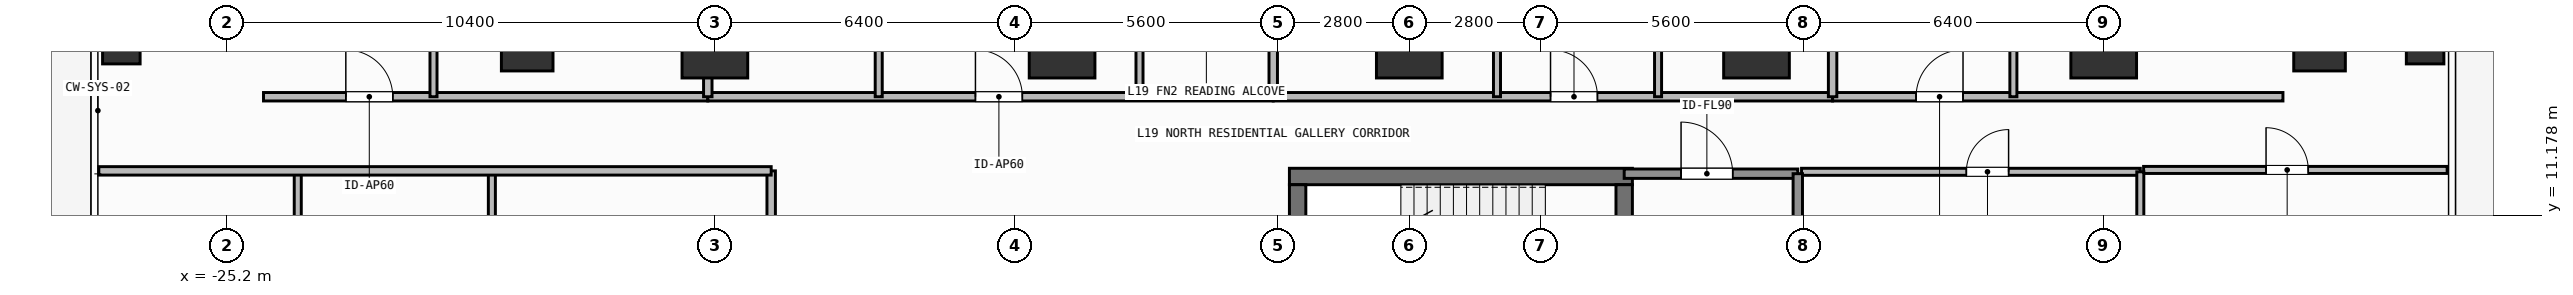
"""IFC4 building model, lengths in metres.
Left out: names, types, materials, properties, quantities, classifications, styles, units other than length and angle.
Written with IfcOpenShell. Run it as: python <this file> out.ifc"""

import sys

from ifc_helpers import new_model, si_unit, direction, frame, frame_2d, origin, origin_2d, place, context, subcontext, project, spatial, rectangle, hollow_rectangle, extrude, element, fill, save


model = new_model("IFC4")
c1 = context("Model", 3, precision=1e-05, world=origin(), true_north=direction((0.0, 1.0)))
c2 = subcontext(c1, "Body", "Model", "MODEL_VIEW")
j1 = project(units=[si_unit("LENGTHUNIT", "METRE"), si_unit("PLANEANGLEUNIT", "RADIAN")], contexts=[c1])
p1 = place(None, origin())
s1 = spatial("IfcSite", under=j1, at=p1, CompositionType="ELEMENT")
p2 = place(p1, origin())
s2 = spatial("IfcBuilding", under=s1, at=p2, CompositionType="ELEMENT")
p3 = place(p2, frame((0.0, 0.0, 73.5)))
s3 = spatial("IfcBuildingStorey", under=s2, at=p3, CompositionType="ELEMENT", Elevation=73.5)
p4 = place(p3, frame((-2.555, 12.0, 0.0), z_axis=(0.0, 0.0, 1.0), x_axis=(1.0, 0.0, 0.0)))
e1 = element("IfcWall", 1, at=p4, inside=s3, PredefinedType="SHEAR", context=c2, shape_type="SweptSolid", body=[
    extrude(rectangle(XDim=7.31, YDim=0.35, at=frame_2d((3.655, 0.0))), origin(), (0.0, 0.0, 1.0), 3.9),
])
p5 = place(p3, frame((-2.38, 8.9, 0.0), z_axis=(0.0, 0.0, 1.0), x_axis=(0.0, 1.0, 0.0)))
e2 = element("IfcWall", 2, at=p5, inside=s3, PredefinedType="SHEAR", context=c2, shape_type="SweptSolid", body=[
    extrude(rectangle(XDim=2.925, YDim=0.35, at=frame_2d((1.462, 0.0))), origin(), (0.0, 0.0, 1.0), 3.9),
])
p6 = place(p3, frame((4.58, 11.825, 0.0), z_axis=(0.0, 0.0, 1.0), x_axis=(0.0, -1.0, 0.0)))
e3 = element("IfcWall", 3, at=p6, inside=s3, PredefinedType="SHEAR", context=c2, shape_type="SweptSolid", body=[
    extrude(rectangle(XDim=2.925, YDim=0.35, at=frame_2d((1.462, 0.0))), origin(), (0.0, 0.0, 1.0), 3.9),
])
p7 = place(p6, frame((0.913, 0.0, 0.0)))
e4 = element("IfcOpeningElement", 4, at=p7, cuts=e3, PredefinedType="OPENING", context=c2, shape_type="SweptSolid", body=[
    extrude(rectangle(XDim=1.1, YDim=2.15, at=frame_2d((0.55, 1.075))), frame((0.0, 0.185, 0.0), z_axis=(0.0, -1.0, 0.0), x_axis=(1.0, 0.0, 0.0)), (0.0, 0.0, 1.0), 0.37),
])
for number, where, z_axis, x_axis in (
    (5, (-14.8, 14.8, 0.0), (0.0, 0.0, 1.0), (1.0, 0.0, 0.0)),
    (6, (-7.4, 14.8, 0.0), (0.0, 0.0, 1.0), (1.0, 0.0, 0.0)),
    (7, (0.0, 14.8, 0.0), (0.0, 0.0, 1.0), (1.0, 0.0, 0.0)),
    (8, (7.4, 14.8, 0.0), (0.0, 0.0, 1.0), (1.0, 0.0, 0.0)),
    (9, (14.8, 14.8, 0.0), (0.0, 0.0, 1.0), (1.0, 0.0, 0.0)),
):
    element("IfcColumn", number, at=place(p3, frame(where, z_axis=z_axis, x_axis=x_axis)), inside=s3, PredefinedType="COLUMN", context=c2, shape_type="SweptSolid", body=[
        extrude(rectangle(XDim=1.4, YDim=1.4, at=origin_2d()), origin(), (0.0, 0.0, 1.0), 3.9),
    ])
for number, where, z_axis, x_axis in (
    (10, (-18.8, 14.8, 0.0), (0.0, 0.0, 1.0), (1.0, 0.0, 0.0)),
    (11, (19.4, 14.8, 0.0), (0.0, 0.0, 1.0), (1.0, 0.0, 0.0)),
):
    element("IfcColumn", number, at=place(p3, frame(where, z_axis=z_axis, x_axis=x_axis)), inside=s3, PredefinedType="COLUMN", context=c2, shape_type="SweptSolid", body=[
        extrude(rectangle(XDim=1.1, YDim=1.1, at=origin_2d()), origin(), (0.0, 0.0, 1.0), 3.9),
    ])
for number, where, z_axis, x_axis in (
    (12, (-27.45, 14.8, 0.0), (0.0, 0.0, 1.0), (1.0, 0.0, 0.0)),
    (13, (21.65, 14.8, 0.0), (0.0, 0.0, 1.0), (1.0, 0.0, 0.0)),
):
    element("IfcColumn", number, at=place(p3, frame(where, z_axis=z_axis, x_axis=x_axis)), inside=s3, PredefinedType="COLUMN", context=c2, shape_type="SweptSolid", body=[
        extrude(hollow_rectangle(XDim=0.8, YDim=0.8, WallThickness=0.036, at=origin_2d()), origin(), (0.0, 0.0, 1.0), 3.9),
    ])
p8 = place(p3, frame((4.58, 12.06, 0.0), z_axis=(0.0, 0.0, 1.0), x_axis=(1.0, 0.0, 0.0)))
e14 = element("IfcWall", 14, at=p8, inside=s3, PredefinedType="SOLIDWALL", context=c2, shape_type="SweptSolid", body=[
    extrude(rectangle(XDim=3.7, YDim=0.2, at=frame_2d((1.85, 0.0))), origin(), (0.0, 0.0, 1.0), 3.6),
])
p9 = place(p8, frame((1.212, 0.0, 0.0)))
e15 = element("IfcOpeningElement", 15, at=p9, cuts=e14, PredefinedType="OPENING", context=c2, shape_type="SweptSolid", body=[
    extrude(rectangle(XDim=1.1, YDim=2.15, at=frame_2d((0.55, 1.075))), frame((0.0, 0.11, 0.0), z_axis=(0.0, -1.0, 0.0), x_axis=(1.0, 0.0, 0.0)), (0.0, 0.0, 1.0), 0.22),
])
p10 = place(p3, frame((8.36, 12.1, 0.0), z_axis=(0.0, 0.0, 1.0), x_axis=(1.0, 0.0, 0.0)))
e16 = element("IfcWall", 16, at=p10, inside=s3, PredefinedType="PARTITIONING", context=c2, shape_type="SweptSolid", body=[
    extrude(rectangle(XDim=7.22, YDim=0.15, at=frame_2d((3.61, 0.0))), origin(), (0.0, 0.0, 1.0), 3.6),
])
p11 = place(p10, frame((3.513, 0.0, 0.0)))
e17 = element("IfcOpeningElement", 17, at=p11, cuts=e16, PredefinedType="OPENING", context=c2, shape_type="SweptSolid", body=[
    extrude(rectangle(XDim=0.9, YDim=2.1, at=frame_2d((0.45, 1.05))), frame((0.0, 0.085, 0.0), z_axis=(0.0, -1.0, 0.0), x_axis=(1.0, 0.0, 0.0)), (0.0, 0.0, 1.0), 0.17),
])
p12 = place(p3, frame((-24.42, 13.7, 0.0), z_axis=(0.0, 0.0, 1.0), x_axis=(1.0, 0.0, 0.0)))
e18 = element("IfcWall", 18, at=p12, inside=s3, PredefinedType="PARTITIONING", context=c2, shape_type="SweptSolid", body=[
    extrude(rectangle(XDim=9.469, YDim=0.18, at=frame_2d((4.734, 0.0))), origin(), (0.0, 0.0, 1.0), 3.6),
])
p13 = place(p12, frame((1.754, 0.0, 0.0)))
e19 = element("IfcOpeningElement", 19, at=p13, cuts=e18, PredefinedType="OPENING", context=c2, shape_type="SweptSolid", body=[
    extrude(rectangle(XDim=1.0, YDim=2.2, at=frame_2d((0.5, 1.1))), frame((0.0, 0.1, 0.0), z_axis=(0.0, -1.0, 0.0), x_axis=(1.0, 0.0, 0.0)), (0.0, 0.0, 1.0), 0.2),
])
p14 = place(p3, frame((-20.797, 13.7, 0.0), z_axis=(0.0, 0.0, 1.0), x_axis=(0.0, 1.0, 0.0)))
e20 = element("IfcWall", 20, at=p14, inside=s3, PredefinedType="PARTITIONING", context=c2, shape_type="SweptSolid", body=[
    extrude(rectangle(XDim=3.899, YDim=0.15, at=frame_2d((1.95, 0.0))), origin(), (0.0, 0.0, 1.0), 3.6),
])
p15 = place(p14, frame((1.524, 0.0, 0.0)))
e21 = element("IfcOpeningElement", 21, at=p15, cuts=e20, PredefinedType="OPENING", context=c2, shape_type="SweptSolid", body=[
    extrude(rectangle(XDim=0.85, YDim=2.1, at=frame_2d((0.425, 1.05))), frame((0.0, 0.085, 0.0), z_axis=(0.0, -1.0, 0.0), x_axis=(1.0, 0.0, 0.0)), (0.0, 0.0, 1.0), 0.17),
])
p16 = place(p3, frame((-14.951, 13.7, 0.0), z_axis=(0.0, 0.0, 1.0), x_axis=(1.0, 0.0, 0.0)))
e22 = element("IfcWall", 22, at=p16, inside=s3, PredefinedType="PARTITIONING", context=c2, shape_type="SweptSolid", body=[
    extrude(rectangle(XDim=12.051, YDim=0.18, at=frame_2d((6.025, 0.0))), origin(), (0.0, 0.0, 1.0), 3.6),
])
p17 = place(p16, frame((5.704, 0.0, 0.0)))
e23 = element("IfcOpeningElement", 23, at=p17, cuts=e22, PredefinedType="OPENING", context=c2, shape_type="SweptSolid", body=[
    extrude(rectangle(XDim=1.0, YDim=2.2, at=frame_2d((0.5, 1.1))), frame((0.0, 0.1, 0.0), z_axis=(0.0, -1.0, 0.0), x_axis=(1.0, 0.0, 0.0)), (0.0, 0.0, 1.0), 0.2),
])
p18 = place(p3, frame((-11.308, 13.7, 0.0), z_axis=(0.0, 0.0, 1.0), x_axis=(0.0, 1.0, 0.0)))
e24 = element("IfcWall", 24, at=p18, inside=s3, PredefinedType="PARTITIONING", context=c2, shape_type="SweptSolid", body=[
    extrude(rectangle(XDim=7.09, YDim=0.15, at=frame_2d((3.545, 0.0))), origin(), (0.0, 0.0, 1.0), 3.29),
])
p19 = place(p18, frame((3.03, 0.0, 0.0)))
e25 = element("IfcOpeningElement", 25, at=p19, cuts=e24, PredefinedType="OPENING", context=c2, shape_type="SweptSolid", body=[
    extrude(rectangle(XDim=0.85, YDim=2.1, at=frame_2d((0.425, 1.05))), frame((0.0, 0.085, 0.0), z_axis=(0.0, -1.0, 0.0), x_axis=(1.0, 0.0, 0.0)), (0.0, 0.0, 1.0), 0.17),
])
p20 = place(p3, frame((-5.75, 13.7, 0.0), z_axis=(0.0, 0.0, 1.0), x_axis=(0.0, 1.0, 0.0)))
e26 = element("IfcWall", 26, at=p20, inside=s3, PredefinedType="PARTITIONING", context=c2, shape_type="SweptSolid", body=[
    extrude(rectangle(XDim=4.02, YDim=0.15, at=frame_2d((2.01, 0.0))), origin(), (0.0, 0.0, 1.0), 3.6),
])
p21 = place(p20, frame((1.941, 0.0, 0.0)))
e27 = element("IfcOpeningElement", 27, at=p21, cuts=e26, PredefinedType="OPENING", context=c2, shape_type="SweptSolid", body=[
    extrude(rectangle(XDim=0.85, YDim=2.1, at=frame_2d((0.425, 1.05))), frame((0.0, 0.085, 0.0), z_axis=(0.0, -1.0, 0.0), x_axis=(1.0, 0.0, 0.0)), (0.0, 0.0, 1.0), 0.17),
])
p22 = place(p3, frame((-2.9, 13.7, 0.0), z_axis=(0.0, 0.0, 1.0), x_axis=(1.0, 0.0, 0.0)))
e28 = element("IfcWall", 28, at=p22, inside=s3, PredefinedType="PARTITIONING", context=c2, shape_type="SweptSolid", body=[
    extrude(rectangle(XDim=11.922, YDim=0.18, at=frame_2d((5.961, 0.0))), origin(), (0.0, 0.0, 1.0), 3.6),
])
p23 = place(p22, frame((5.91, 0.0, 0.0)))
e29 = element("IfcOpeningElement", 29, at=p23, cuts=e28, PredefinedType="OPENING", context=c2, shape_type="SweptSolid", body=[
    extrude(rectangle(XDim=1.0, YDim=2.2, at=frame_2d((0.5, 1.1))), frame((0.0, 0.1, 0.0), z_axis=(0.0, -1.0, 0.0), x_axis=(1.0, 0.0, 0.0)), (0.0, 0.0, 1.0), 0.2),
])
p24 = place(p3, frame((1.869, 13.7, 0.0), z_axis=(0.0, 0.0, 1.0), x_axis=(0.0, 1.0, 0.0)))
e30 = element("IfcWall", 30, at=p24, inside=s3, PredefinedType="PARTITIONING", context=c2, shape_type="SweptSolid", body=[
    extrude(rectangle(XDim=7.09, YDim=0.15, at=frame_2d((3.545, 0.0))), origin(), (0.0, 0.0, 1.0), 3.6),
])
p25 = place(p24, frame((3.03, 0.0, 0.0)))
e31 = element("IfcOpeningElement", 31, at=p25, cuts=e30, PredefinedType="OPENING", context=c2, shape_type="SweptSolid", body=[
    extrude(rectangle(XDim=0.85, YDim=2.1, at=frame_2d((0.425, 1.05))), frame((0.0, 0.085, 0.0), z_axis=(0.0, -1.0, 0.0), x_axis=(1.0, 0.0, 0.0)), (0.0, 0.0, 1.0), 0.17),
])
p26 = place(p3, frame((5.302, 13.7, 0.0), z_axis=(0.0, 0.0, 1.0), x_axis=(0.0, 1.0, 0.0)))
e32 = element("IfcWall", 32, at=p26, inside=s3, PredefinedType="PARTITIONING", context=c2, shape_type="SweptSolid", body=[
    extrude(rectangle(XDim=7.09, YDim=0.15, at=frame_2d((3.545, 0.0))), origin(), (0.0, 0.0, 1.0), 3.6),
])
p27 = place(p26, frame((3.03, 0.0, 0.0)))
e33 = element("IfcOpeningElement", 33, at=p27, cuts=e32, PredefinedType="OPENING", context=c2, shape_type="SweptSolid", body=[
    extrude(rectangle(XDim=0.85, YDim=2.1, at=frame_2d((0.425, 1.05))), frame((0.0, 0.085, 0.0), z_axis=(0.0, -1.0, 0.0), x_axis=(1.0, 0.0, 0.0)), (0.0, 0.0, 1.0), 0.17),
])
p28 = place(p3, frame((9.022, 13.7, 0.0), z_axis=(0.0, 0.0, 1.0), x_axis=(1.0, 0.0, 0.0)))
e34 = element("IfcWall", 34, at=p28, inside=s3, PredefinedType="PARTITIONING", context=c2, shape_type="SweptSolid", body=[
    extrude(rectangle(XDim=9.598, YDim=0.18, at=frame_2d((4.799, 0.0))), origin(), (0.0, 0.0, 1.0), 3.6),
])
p29 = place(p28, frame((1.78, 0.0, 0.0)))
e35 = element("IfcOpeningElement", 35, at=p29, cuts=e34, PredefinedType="OPENING", context=c2, shape_type="SweptSolid", body=[
    extrude(rectangle(XDim=1.0, YDim=2.2, at=frame_2d((0.5, 1.1))), frame((0.0, 0.1, 0.0), z_axis=(0.0, -1.0, 0.0), x_axis=(1.0, 0.0, 0.0)), (0.0, 0.0, 1.0), 0.2),
])
p30 = place(p3, frame((12.875, 13.7, 0.0), z_axis=(0.0, 0.0, 1.0), x_axis=(0.0, 1.0, 0.0)))
e36 = element("IfcWall", 36, at=p30, inside=s3, PredefinedType="PARTITIONING", context=c2, shape_type="SweptSolid", body=[
    extrude(rectangle(XDim=3.899, YDim=0.15, at=frame_2d((1.95, 0.0))), origin(), (0.0, 0.0, 1.0), 3.6),
])
p31 = place(p30, frame((1.865, 0.0, 0.0)))
e37 = element("IfcOpeningElement", 37, at=p31, cuts=e36, PredefinedType="OPENING", context=c2, shape_type="SweptSolid", body=[
    extrude(rectangle(XDim=0.85, YDim=2.1, at=frame_2d((0.425, 1.05))), frame((0.0, 0.085, 0.0), z_axis=(0.0, -1.0, 0.0), x_axis=(1.0, 0.0, 0.0)), (0.0, 0.0, 1.0), 0.17),
])
p32 = place(p3, frame((-13.6, -0.873, 0.0), z_axis=(0.0, 0.0, 1.0), x_axis=(0.0, 1.0, 0.0)))
e38 = element("IfcWall", 38, at=p32, inside=s3, PredefinedType="PARTITIONING", context=c2, shape_type="SweptSolid", body=[
    extrude(rectangle(XDim=12.993, YDim=0.18, at=frame_2d((6.497, 0.0))), origin(), (0.0, 0.0, 1.0), 3.6),
])
p33 = place(p32, frame((6.446, 0.0, 0.0)))
e39 = element("IfcOpeningElement", 39, at=p33, cuts=e38, PredefinedType="OPENING", context=c2, shape_type="SweptSolid", body=[
    extrude(rectangle(XDim=1.0, YDim=2.2, at=frame_2d((0.5, 1.1))), frame((0.0, 0.1, 0.0), z_axis=(0.0, -1.0, 0.0), x_axis=(1.0, 0.0, 0.0)), (0.0, 0.0, 1.0), 0.2),
])
p34 = place(p3, frame((15.65, 12.14, 0.0), z_axis=(0.0, 0.0, 1.0), x_axis=(1.0, 0.0, 0.0)))
e40 = element("IfcWall", 40, at=p34, inside=s3, PredefinedType="PARTITIONING", context=c2, shape_type="SweptSolid", body=[
    extrude(rectangle(XDim=6.47, YDim=0.15, at=frame_2d((3.235, 0.0))), origin(), (0.0, 0.0, 1.0), 3.6),
])
p35 = place(p34, frame((2.61, 0.0, 0.0)))
e41 = element("IfcOpeningElement", 41, at=p35, cuts=e40, PredefinedType="OPENING", context=c2, shape_type="SweptSolid", body=[
    extrude(rectangle(XDim=0.9, YDim=2.1, at=frame_2d((0.45, 1.05))), frame((0.0, 0.085, 0.0), z_axis=(0.0, -1.0, 0.0), x_axis=(1.0, 0.0, 0.0)), (0.0, 0.0, 1.0), 0.17),
])
p36 = place(p3, frame((8.28, 8.95, 0.0), z_axis=(0.0, 0.0, 1.0), x_axis=(0.0, 1.0, 0.0)))
e42 = element("IfcWall", 42, at=p36, inside=s3, PredefinedType="SOLIDWALL", context=c2, shape_type="SweptSolid", body=[
    extrude(rectangle(XDim=3.11, YDim=0.2, at=frame_2d((1.555, 0.0))), origin(), (0.0, 0.0, 1.0), 3.6),
])
p37 = place(p3, frame((15.58, 5.85, 0.0), z_axis=(0.0, 0.0, 1.0), x_axis=(0.0, 1.0, 0.0)))
e43 = element("IfcWall", 43, at=p37, inside=s3, PredefinedType="PARTITIONING", context=c2, shape_type="SweptSolid", body=[
    extrude(rectangle(XDim=6.25, YDim=0.15, at=frame_2d((3.125, 0.0))), origin(), (0.0, 0.0, 1.0), 3.6),
])
p38 = place(p3, frame((-14.951, 13.7, 0.0), z_axis=(0.0, 0.0, 1.0), x_axis=(0.0, 1.0, 0.0)))
e44 = element("IfcWall", 44, at=p38, inside=s3, PredefinedType="PARTITIONING", context=c2, shape_type="SweptSolid", body=[
    extrude(rectangle(XDim=11.33, YDim=0.18, at=frame_2d((5.665, 0.0))), origin(), (0.0, 0.0, 1.0), 3.002),
])
for number, where, z_axis, x_axis in (
    (45, (-2.9, 13.7, 0.0), (0.0, 0.0, 1.0), (0.0, 1.0, 0.0)),
    (46, (9.022, 13.7, 0.0), (0.0, 0.0, 1.0), (0.0, 1.0, 0.0)),
):
    element("IfcWall", number, at=place(p3, frame(where, z_axis=z_axis, x_axis=x_axis)), inside=s3, PredefinedType="PARTITIONING", context=c2, shape_type="SweptSolid", body=[
        extrude(rectangle(XDim=11.33, YDim=0.18, at=frame_2d((5.665, 0.0))), origin(), (0.0, 0.0, 1.0), 3.6),
    ])
for number, where, z_axis, x_axis in (
    (47, (-19.553, 9.32, 0.0), (0.0, 0.0, 1.0), (0.0, 1.0, 0.0)),
    (48, (-23.69, 9.32, 0.0), (0.0, 0.0, 1.0), (0.0, 1.0, 0.0)),
):
    element("IfcWall", number, at=place(p3, frame(where, z_axis=z_axis, x_axis=x_axis)), inside=s3, PredefinedType="PARTITIONING", context=c2, shape_type="SweptSolid", body=[
        extrude(rectangle(XDim=2.8, YDim=0.15, at=frame_2d((1.4, 0.0))), origin(), (0.0, 0.0, 1.0), 3.6),
    ])
p39 = place(p3, frame((-27.93, 12.12, 0.0), z_axis=(0.0, 0.0, 1.0), x_axis=(1.0, 0.0, 0.0)))
e49 = element("IfcWall", 49, at=p39, inside=s3, PredefinedType="PARTITIONING", context=c2, shape_type="SweptSolid", body=[
    extrude(rectangle(XDim=14.33, YDim=0.18, at=frame_2d((7.165, 0.0))), origin(), (0.0, 0.0, 1.0), 3.6),
])
p40 = place(p9, origin())
e50 = element("IfcDoor", 50, at=p40, inside=s3, OperationType="SINGLE_SWING_LEFT", PredefinedType="DOOR", context=c2, shape_type="SweptSolid", body=[
    extrude(rectangle(XDim=1.1, YDim=2.15, at=frame_2d((0.55, 1.075))), frame((0.0, 0.025, 0.0), z_axis=(0.0, -1.0, 0.0), x_axis=(1.0, 0.0, 0.0)), (0.0, 0.0, 1.0), 0.05),
])
fill(e15, e50)
p41 = place(p11, origin())
e51 = element("IfcDoor", 51, at=p41, inside=s3, OperationType="SINGLE_SWING_RIGHT", PredefinedType="DOOR", context=c2, shape_type="SweptSolid", body=[
    extrude(rectangle(XDim=0.9, YDim=2.1, at=frame_2d((0.45, 1.05))), frame((0.0, 0.025, 0.0), z_axis=(0.0, -1.0, 0.0), x_axis=(1.0, 0.0, 0.0)), (0.0, 0.0, 1.0), 0.05),
])
fill(e17, e51)
p42 = place(p13, origin())
e52 = element("IfcDoor", 52, at=p42, inside=s3, OperationType="SINGLE_SWING_LEFT", PredefinedType="DOOR", context=c2, shape_type="SweptSolid", body=[
    extrude(rectangle(XDim=1.0, YDim=2.2, at=frame_2d((0.5, 1.1))), frame((0.0, 0.025, 0.0), z_axis=(0.0, -1.0, 0.0), x_axis=(1.0, 0.0, 0.0)), (0.0, 0.0, 1.0), 0.05),
])
fill(e19, e52)
p43 = place(p17, origin())
e53 = element("IfcDoor", 53, at=p43, inside=s3, OperationType="SINGLE_SWING_LEFT", PredefinedType="DOOR", context=c2, shape_type="SweptSolid", body=[
    extrude(rectangle(XDim=1.0, YDim=2.2, at=frame_2d((0.5, 1.1))), frame((0.0, 0.025, 0.0), z_axis=(0.0, -1.0, 0.0), x_axis=(1.0, 0.0, 0.0)), (0.0, 0.0, 1.0), 0.05),
])
fill(e23, e53)
p44 = place(p23, origin())
e54 = element("IfcDoor", 54, at=p44, inside=s3, OperationType="SINGLE_SWING_LEFT", PredefinedType="DOOR", context=c2, shape_type="SweptSolid", body=[
    extrude(rectangle(XDim=1.0, YDim=2.2, at=frame_2d((0.5, 1.1))), frame((0.0, 0.025, 0.0), z_axis=(0.0, -1.0, 0.0), x_axis=(1.0, 0.0, 0.0)), (0.0, 0.0, 1.0), 0.05),
])
fill(e29, e54)
p45 = place(p29, origin())
e55 = element("IfcDoor", 55, at=p45, inside=s3, OperationType="SINGLE_SWING_RIGHT", PredefinedType="DOOR", context=c2, shape_type="SweptSolid", body=[
    extrude(rectangle(XDim=1.0, YDim=2.2, at=frame_2d((0.5, 1.1))), frame((0.0, 0.025, 0.0), z_axis=(0.0, -1.0, 0.0), x_axis=(1.0, 0.0, 0.0)), (0.0, 0.0, 1.0), 0.05),
])
fill(e35, e55)
p46 = place(p35, origin())
e56 = element("IfcDoor", 56, at=p46, inside=s3, OperationType="SINGLE_SWING_LEFT", PredefinedType="DOOR", context=c2, shape_type="SweptSolid", body=[
    extrude(rectangle(XDim=0.9, YDim=2.1, at=frame_2d((0.45, 1.05))), frame((0.0, 0.025, 0.0), z_axis=(0.0, -1.0, 0.0), x_axis=(1.0, 0.0, 0.0)), (0.0, 0.0, 1.0), 0.05),
])
fill(e41, e56)
save(model, sys.argv[1])
